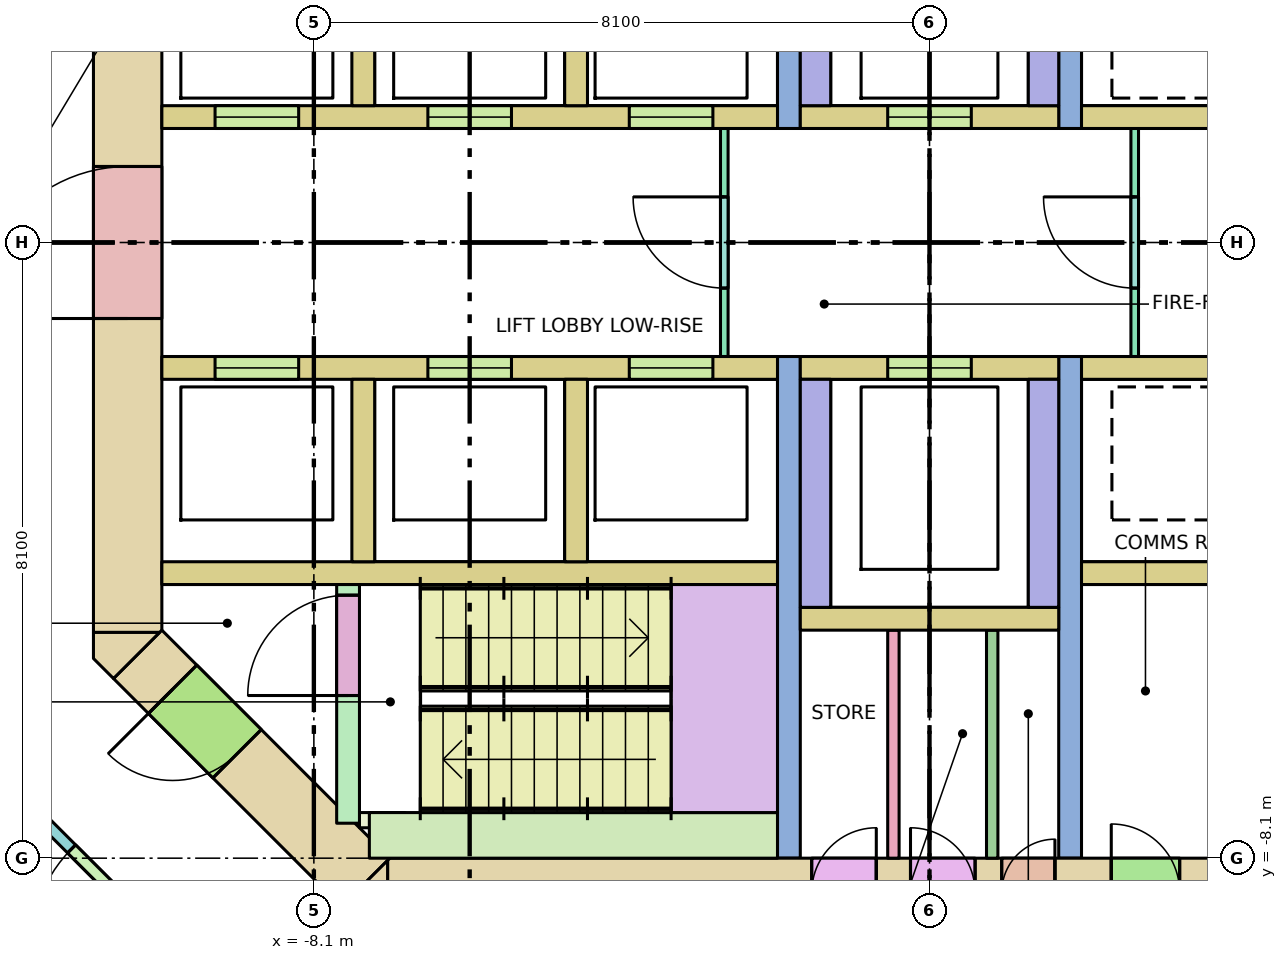
"""IFC4 building model, lengths in metres.
Left out: names, types, materials, properties, quantities, classifications, styles, units other than length and angle.
Written with IfcOpenShell. Run it as: python <this file> out.ifc"""

import sys

from ifc_helpers import new_model, si_unit, direction, frame, frame_2d, origin, place, context, subcontext, project, spatial, polyline, rectangle, outline, extrude, element, fill, save


model = new_model("IFC4")
c1 = context("Model", 3, precision=1e-05, world=origin(), true_north=direction((0.0, 1.0)))
c2 = subcontext(c1, "Body", "Model", "MODEL_VIEW")
j1 = project(units=[si_unit("LENGTHUNIT", "METRE"), si_unit("PLANEANGLEUNIT", "RADIAN")], contexts=[c1])
p1 = place(None, origin())
s1 = spatial("IfcSite", under=j1, at=p1, CompositionType="ELEMENT")
p2 = place(p1, origin())
s2 = spatial("IfcBuilding", under=s1, at=p2, CompositionType="ELEMENT")
p3 = place(p2, frame((0.0, 0.0, 51.0)))
s3 = spatial("IfcBuildingStorey", under=s2, at=p3, CompositionType="ELEMENT", Elevation=51.0)
p4 = place(p3, frame((-7.13, -8.55, -0.28), z_axis=(0.0, 0.0, 1.0), x_axis=(1.0, 0.0, 0.0)))
e1 = element("IfcWall", 1, at=p4, inside=s3, PredefinedType="SHEAR", context=c2, shape_type="SweptSolid", body=[
    extrude(rectangle(XDim=14.26, YDim=0.9, at=frame_2d((7.13, 0.0))), origin(), (0.0, 0.0, 1.0), 4.0),
])
p5 = place(p4, frame((8.08, 0.0, 0.28)))
e2 = element("IfcOpeningElement", 2, at=p5, cuts=e1, PredefinedType="OPENING", context=c2, shape_type="SweptSolid", body=[
    extrude(rectangle(XDim=0.7, YDim=2.1, at=frame_2d((0.35, 1.05))), frame((0.0, 0.46, 0.0), z_axis=(0.0, -1.0, 0.0), x_axis=(1.0, 0.0, 0.0)), (0.0, 0.0, 1.0), 0.92),
])
p6 = place(p4, frame((5.58, 0.0, 0.28)))
e3 = element("IfcOpeningElement", 3, at=p6, cuts=e1, PredefinedType="OPENING", context=c2, shape_type="SweptSolid", body=[
    extrude(rectangle(XDim=0.85, YDim=2.1, at=frame_2d((0.425, 1.05))), frame((0.0, 0.46, 0.0), z_axis=(0.0, -1.0, 0.0), x_axis=(1.0, 0.0, 0.0)), (0.0, 0.0, 1.0), 0.92),
])
p7 = place(p4, frame((6.88, 0.0, 0.28)))
e4 = element("IfcOpeningElement", 4, at=p7, cuts=e1, PredefinedType="OPENING", context=c2, shape_type="SweptSolid", body=[
    extrude(rectangle(XDim=0.85, YDim=2.1, at=frame_2d((0.425, 1.05))), frame((0.0, 0.46, 0.0), z_axis=(0.0, -1.0, 0.0), x_axis=(1.0, 0.0, 0.0)), (0.0, 0.0, 1.0), 0.92),
])
p8 = place(p4, frame((9.521, 0.0, 0.28)))
e5 = element("IfcOpeningElement", 5, at=p8, cuts=e1, PredefinedType="OPENING", context=c2, shape_type="SweptSolid", body=[
    extrude(rectangle(XDim=0.9, YDim=2.1, at=frame_2d((0.45, 1.05))), frame((0.0, 0.46, 0.0), z_axis=(0.0, -1.0, 0.0), x_axis=(1.0, 0.0, 0.0)), (0.0, 0.0, 1.0), 0.92),
])
p9 = place(p4, frame((11.278, 0.0, 0.28)))
e6 = element("IfcOpeningElement", 6, at=p9, cuts=e1, PredefinedType="OPENING", context=c2, shape_type="SweptSolid", body=[
    extrude(rectangle(XDim=0.9, YDim=2.1, at=frame_2d((0.45, 1.05))), frame((0.0, 0.46, 0.0), z_axis=(0.0, -1.0, 0.0), x_axis=(1.0, 0.0, 0.0)), (0.0, 0.0, 1.0), 0.92),
])
p10 = place(p4, frame((12.84, 0.0, 0.28)))
e7 = element("IfcOpeningElement", 7, at=p10, cuts=e1, PredefinedType="OPENING", context=c2, shape_type="SweptSolid", body=[
    extrude(rectangle(XDim=0.9, YDim=2.1, at=frame_2d((0.45, 1.05))), frame((0.0, 0.46, 0.0), z_axis=(0.0, -1.0, 0.0), x_axis=(1.0, 0.0, 0.0)), (0.0, 0.0, 1.0), 0.92),
])
p11 = place(p3, frame((-10.55, -5.13, -0.28), z_axis=(0.0, 0.0, 1.0), x_axis=(0.0, 1.0, 0.0)))
e8 = element("IfcWall", 8, at=p11, inside=s3, PredefinedType="SHEAR", context=c2, shape_type="SweptSolid", body=[
    extrude(rectangle(XDim=10.26, YDim=0.9, at=frame_2d((5.13, 0.0))), origin(), (0.0, 0.0, 1.0), 4.0),
])
p12 = place(p11, frame((4.13, 0.0, 0.28)))
e9 = element("IfcOpeningElement", 9, at=p12, cuts=e8, PredefinedType="OPENING", context=c2, shape_type="SweptSolid", body=[
    extrude(rectangle(XDim=2.0, YDim=2.1, at=frame_2d((1.0, 1.05))), frame((0.0, 0.46, 0.0), z_axis=(0.0, -1.0, 0.0), x_axis=(1.0, 0.0, 0.0)), (0.0, 0.0, 1.0), 0.92),
])
p13 = place(p3, frame((-7.418, -8.418, -0.28), z_axis=(0.0, 0.0, 1.0), x_axis=(-0.707106781187, 0.707106781187, 0.0)))
e10 = element("IfcWall", 10, at=p13, inside=s3, PredefinedType="SHEAR", context=c2, shape_type="SweptSolid", body=[
    extrude(rectangle(XDim=4.243, YDim=0.9, at=frame_2d((2.121, 0.0))), origin(), (0.0, 0.0, 1.0), 4.0),
])
p14 = place(p13, frame((2.393, 0.0, 0.28)))
e11 = element("IfcOpeningElement", 11, at=p14, cuts=e10, PredefinedType="OPENING", context=c2, shape_type="SweptSolid", body=[
    extrude(rectangle(XDim=1.2, YDim=2.1, at=frame_2d((0.6, 1.05))), frame((0.0, 0.46, 0.0), z_axis=(0.0, -1.0, 0.0), x_axis=(1.0, 0.0, 0.0)), (0.0, 0.0, 1.0), 0.92),
])
p15 = place(p3, frame((0.0, 0.0, -0.28)))
e12 = element("IfcWall", 12, at=p15, inside=s3, PredefinedType="SHEAR", context=c2, shape_type="SweptSolid", body=[
    extrude(outline(polyline([(-7.473, -9.0), (-7.736, -8.736), (-7.13, -8.13), (-7.13, -9.0), (-7.473, -9.0)])), origin(), (0.0, 0.0, 1.0), 4.0),
])
p16 = place(p3, frame((0.0, 0.0, -0.28)))
e13 = element("IfcWall", 13, at=p16, inside=s3, PredefinedType="SHEAR", context=c2, shape_type="SweptSolid", body=[
    extrude(outline(polyline([(-11.0, -5.473), (-11.0, -5.13), (-10.13, -5.13), (-10.736, -5.736), (-11.0, -5.473)])), origin(), (0.0, 0.0, 1.0), 4.0),
])
for number, where, z_axis, x_axis in (
    (14, (-10.1, -4.35, 0.0), (0.0, 0.0, 1.0), (1.0, 0.0, 0.0)),
    (15, (2.0, -4.35, 0.0), (0.0, 0.0, 1.0), (1.0, 0.0, 0.0)),
):
    element("IfcWall", number, at=place(p3, frame(where, z_axis=z_axis, x_axis=x_axis)), inside=s3, PredefinedType="SOLIDWALL", context=c2, shape_type="SweptSolid", body=[
        extrude(rectangle(XDim=8.1, YDim=0.3, at=frame_2d((4.05, 0.0))), origin(), (0.0, 0.0, 1.0), 3.72),
    ])
p17 = place(p3, frame((-10.1, 1.65, 0.0), z_axis=(0.0, 0.0, 1.0), x_axis=(1.0, 0.0, 0.0)))
e16 = element("IfcWall", 16, at=p17, inside=s3, PredefinedType="SOLIDWALL", context=c2, shape_type="SweptSolid", body=[
    extrude(rectangle(XDim=8.1, YDim=0.3, at=frame_2d((4.05, 0.0))), origin(), (0.0, 0.0, 1.0), 3.72),
])
p18 = place(p17, frame((0.7, 0.0, 0.0)))
e17 = element("IfcOpeningElement", 17, at=p18, cuts=e16, PredefinedType="OPENING", context=c2, shape_type="SweptSolid", body=[
    extrude(rectangle(XDim=1.1, YDim=2.1, at=frame_2d((0.55, 1.05))), frame((0.0, 0.16, 0.0), z_axis=(0.0, -1.0, 0.0), x_axis=(1.0, 0.0, 0.0)), (0.0, 0.0, 1.0), 0.32),
])
p19 = place(p17, frame((3.5, 0.0, 0.0)))
e18 = element("IfcOpeningElement", 18, at=p19, cuts=e16, PredefinedType="OPENING", context=c2, shape_type="SweptSolid", body=[
    extrude(rectangle(XDim=1.1, YDim=2.1, at=frame_2d((0.55, 1.05))), frame((0.0, 0.16, 0.0), z_axis=(0.0, -1.0, 0.0), x_axis=(1.0, 0.0, 0.0)), (0.0, 0.0, 1.0), 0.32),
])
p20 = place(p17, frame((6.15, 0.0, 0.0)))
e19 = element("IfcOpeningElement", 19, at=p20, cuts=e16, PredefinedType="OPENING", context=c2, shape_type="SweptSolid", body=[
    extrude(rectangle(XDim=1.1, YDim=2.1, at=frame_2d((0.55, 1.05))), frame((0.0, 0.16, 0.0), z_axis=(0.0, -1.0, 0.0), x_axis=(1.0, 0.0, 0.0)), (0.0, 0.0, 1.0), 0.32),
])
p21 = place(p3, frame((-10.1, -1.65, 0.0), z_axis=(0.0, 0.0, 1.0), x_axis=(1.0, 0.0, 0.0)))
e20 = element("IfcWall", 20, at=p21, inside=s3, PredefinedType="SOLIDWALL", context=c2, shape_type="SweptSolid", body=[
    extrude(rectangle(XDim=8.1, YDim=0.3, at=frame_2d((4.05, 0.0))), origin(), (0.0, 0.0, 1.0), 3.72),
])
p22 = place(p21, frame((0.7, 0.0, 0.0)))
e21 = element("IfcOpeningElement", 21, at=p22, cuts=e20, PredefinedType="OPENING", context=c2, shape_type="SweptSolid", body=[
    extrude(rectangle(XDim=1.1, YDim=2.1, at=frame_2d((0.55, 1.05))), frame((0.0, 0.16, 0.0), z_axis=(0.0, -1.0, 0.0), x_axis=(1.0, 0.0, 0.0)), (0.0, 0.0, 1.0), 0.32),
])
p23 = place(p21, frame((3.5, 0.0, 0.0)))
e22 = element("IfcOpeningElement", 22, at=p23, cuts=e20, PredefinedType="OPENING", context=c2, shape_type="SweptSolid", body=[
    extrude(rectangle(XDim=1.1, YDim=2.1, at=frame_2d((0.55, 1.05))), frame((0.0, 0.16, 0.0), z_axis=(0.0, -1.0, 0.0), x_axis=(1.0, 0.0, 0.0)), (0.0, 0.0, 1.0), 0.32),
])
p24 = place(p21, frame((6.15, 0.0, 0.0)))
e23 = element("IfcOpeningElement", 23, at=p24, cuts=e20, PredefinedType="OPENING", context=c2, shape_type="SweptSolid", body=[
    extrude(rectangle(XDim=1.1, YDim=2.1, at=frame_2d((0.55, 1.05))), frame((0.0, 0.16, 0.0), z_axis=(0.0, -1.0, 0.0), x_axis=(1.0, 0.0, 0.0)), (0.0, 0.0, 1.0), 0.32),
])
for number, where, z_axis, x_axis in (
    (24, (2.0, 1.65, 0.0), (0.0, 0.0, 1.0), (1.0, 0.0, 0.0)),
    (25, (2.0, -1.65, 0.0), (0.0, 0.0, 1.0), (1.0, 0.0, 0.0)),
):
    element("IfcWall", number, at=place(p3, frame(where, z_axis=z_axis, x_axis=x_axis)), inside=s3, PredefinedType="SOLIDWALL", context=c2, shape_type="SweptSolid", body=[
        extrude(rectangle(XDim=8.1, YDim=0.3, at=frame_2d((4.05, 0.0))), origin(), (0.0, 0.0, 1.0), 3.72),
    ])
for number, where, z_axis, x_axis in (
    (26, (-7.45, 1.8, 0.0), (0.0, 0.0, 1.0), (0.0, 1.0, 0.0)),
    (27, (-7.45, -4.2, 0.0), (0.0, 0.0, 1.0), (0.0, 1.0, 0.0)),
    (28, (-4.65, 1.8, 0.0), (0.0, 0.0, 1.0), (0.0, 1.0, 0.0)),
    (29, (-4.65, -4.2, 0.0), (0.0, 0.0, 1.0), (0.0, 1.0, 0.0)),
):
    element("IfcWall", number, at=place(p3, frame(where, z_axis=z_axis, x_axis=x_axis)), inside=s3, PredefinedType="SOLIDWALL", context=c2, shape_type="SweptSolid", body=[
        extrude(rectangle(XDim=2.4, YDim=0.3, at=frame_2d((1.2, 0.0))), origin(), (0.0, 0.0, 1.0), 3.72),
    ])
for number, where, z_axis, x_axis in (
    (30, (-1.85, 1.5, 0.0), (0.0, 0.0, 1.0), (0.0, 1.0, 0.0)),
    (31, (-1.85, -8.1, 0.0), (0.0, 0.0, 1.0), (0.0, 1.0, 0.0)),
    (32, (1.85, 1.5, 0.0), (0.0, 0.0, 1.0), (0.0, 1.0, 0.0)),
    (33, (1.85, -8.1, 0.0), (0.0, 0.0, 1.0), (0.0, 1.0, 0.0)),
):
    element("IfcWall", number, at=place(p3, frame(where, z_axis=z_axis, x_axis=x_axis)), inside=s3, PredefinedType="SHEAR", context=c2, shape_type="SweptSolid", body=[
        extrude(rectangle(XDim=6.6, YDim=0.3, at=frame_2d((3.3, 0.0))), origin(), (0.0, 0.0, 1.0), 3.72),
    ])
p25 = place(p3, frame((-1.7, 1.65, 0.0), z_axis=(0.0, 0.0, 1.0), x_axis=(1.0, 0.0, 0.0)))
e34 = element("IfcWall", 34, at=p25, inside=s3, PredefinedType="SOLIDWALL", context=c2, shape_type="SweptSolid", body=[
    extrude(rectangle(XDim=3.4, YDim=0.3, at=frame_2d((1.7, 0.0))), origin(), (0.0, 0.0, 1.0), 3.72),
])
p26 = place(p25, frame((1.15, 0.0, 0.0)))
e35 = element("IfcOpeningElement", 35, at=p26, cuts=e34, PredefinedType="OPENING", context=c2, shape_type="SweptSolid", body=[
    extrude(rectangle(XDim=1.1, YDim=2.1, at=frame_2d((0.55, 1.05))), frame((0.0, 0.16, 0.0), z_axis=(0.0, -1.0, 0.0), x_axis=(1.0, 0.0, 0.0)), (0.0, 0.0, 1.0), 0.32),
])
p27 = place(p3, frame((-1.7, -1.65, 0.0), z_axis=(0.0, 0.0, 1.0), x_axis=(1.0, 0.0, 0.0)))
e36 = element("IfcWall", 36, at=p27, inside=s3, PredefinedType="SOLIDWALL", context=c2, shape_type="SweptSolid", body=[
    extrude(rectangle(XDim=3.4, YDim=0.3, at=frame_2d((1.7, 0.0))), origin(), (0.0, 0.0, 1.0), 3.72),
])
p28 = place(p27, frame((1.15, 0.0, 0.0)))
e37 = element("IfcOpeningElement", 37, at=p28, cuts=e36, PredefinedType="OPENING", context=c2, shape_type="SweptSolid", body=[
    extrude(rectangle(XDim=1.1, YDim=2.1, at=frame_2d((0.55, 1.05))), frame((0.0, 0.16, 0.0), z_axis=(0.0, -1.0, 0.0), x_axis=(1.0, 0.0, 0.0)), (0.0, 0.0, 1.0), 0.32),
])
for number, where, z_axis, x_axis in (
    (38, (-1.5, 1.8, 0.0), (0.0, 0.0, 1.0), (0.0, 1.0, 0.0)),
    (39, (-1.5, -4.8, 0.0), (0.0, 0.0, 1.0), (0.0, 1.0, 0.0)),
    (40, (1.5, 1.8, 0.0), (0.0, 0.0, 1.0), (0.0, 1.0, 0.0)),
    (41, (1.5, -4.8, 0.0), (0.0, 0.0, 1.0), (0.0, 1.0, 0.0)),
):
    element("IfcWall", number, at=place(p3, frame(where, z_axis=z_axis, x_axis=x_axis)), inside=s3, PredefinedType="SOLIDWALL", context=c2, shape_type="SweptSolid", body=[
        extrude(rectangle(XDim=3.0, YDim=0.4, at=frame_2d((1.5, 0.0))), origin(), (0.0, 0.0, 1.0), 3.72),
    ])
p29 = place(p3, frame((-1.7, -4.95, 0.0), z_axis=(0.0, 0.0, 1.0), x_axis=(1.0, 0.0, 0.0)))
e42 = element("IfcWall", 42, at=p29, inside=s3, PredefinedType="SOLIDWALL", context=c2, shape_type="SweptSolid", body=[
    extrude(rectangle(XDim=3.4, YDim=0.3, at=frame_2d((1.7, 0.0))), origin(), (0.0, 0.0, 1.0), 3.72),
])
p30 = place(p3, frame((-7.65, -7.64, 0.0), z_axis=(0.0, 0.0, 1.0), x_axis=(0.0, 1.0, 0.0)))
e43 = element("IfcWall", 43, at=p30, inside=s3, PredefinedType="SHEAR", context=c2, shape_type="SweptSolid", body=[
    extrude(rectangle(XDim=3.14, YDim=0.3, at=frame_2d((1.57, 0.0))), origin(), (0.0, 0.0, 1.0), 3.72),
])
p31 = place(p30, frame((1.68, 0.0, 0.0)))
e44 = element("IfcOpeningElement", 44, at=p31, cuts=e43, PredefinedType="OPENING", context=c2, shape_type="SweptSolid", body=[
    extrude(rectangle(XDim=1.32, YDim=2.1, at=frame_2d((0.66, 1.05))), frame((0.0, 0.16, 0.0), z_axis=(0.0, -1.0, 0.0), x_axis=(1.0, 0.0, 0.0)), (0.0, 0.0, 1.0), 0.32),
])
p32 = place(p3, frame((-7.5, -7.6, 0.0), z_axis=(0.0, 0.0, 1.0), x_axis=(1.0, 0.0, 0.0)))
e45 = element("IfcWall", 45, at=p32, inside=s3, PredefinedType="SHEAR", context=c2, shape_type="SweptSolid", body=[
    extrude(rectangle(XDim=0.6, YDim=0.2, at=frame_2d((0.3, 0.0))), origin(), (0.0, 0.0, 1.0), 3.72),
])
p33 = place(p3, frame((-7.37, -7.8, 0.0), z_axis=(0.0, 0.0, 1.0), x_axis=(1.0, 0.0, 0.0)))
e46 = element("IfcWall", 46, at=p33, inside=s3, PredefinedType="SHEAR", context=c2, shape_type="SweptSolid", body=[
    extrude(rectangle(XDim=5.37, YDim=0.6, at=frame_2d((2.685, 0.0))), origin(), (0.0, 0.0, 1.0), 3.72),
])
p34 = place(p3, frame((-2.7, -1.5, 0.0), z_axis=(0.0, 0.0, 1.0), x_axis=(0.0, 1.0, 0.0)))
e47 = element("IfcWall", 47, at=p34, inside=s3, PredefinedType="PARTITIONING", context=c2, shape_type="SweptSolid", body=[
    extrude(rectangle(XDim=3.0, YDim=0.1, at=frame_2d((1.5, 0.0))), origin(), (0.0, 0.0, 1.0), 3.72),
])
p35 = place(p34, frame((0.9, 0.0, 0.0)))
e48 = element("IfcOpeningElement", 48, at=p35, cuts=e47, PredefinedType="OPENING", context=c2, shape_type="SweptSolid", body=[
    extrude(rectangle(XDim=1.2, YDim=2.1, at=frame_2d((0.6, 1.05))), frame((0.0, 0.06, 0.0), z_axis=(0.0, -1.0, 0.0), x_axis=(1.0, 0.0, 0.0)), (0.0, 0.0, 1.0), 0.12),
])
p36 = place(p3, frame((2.7, -1.5, 0.0), z_axis=(0.0, 0.0, 1.0), x_axis=(0.0, 1.0, 0.0)))
e49 = element("IfcWall", 49, at=p36, inside=s3, PredefinedType="PARTITIONING", context=c2, shape_type="SweptSolid", body=[
    extrude(rectangle(XDim=3.0, YDim=0.1, at=frame_2d((1.5, 0.0))), origin(), (0.0, 0.0, 1.0), 3.72),
])
p37 = place(p36, frame((0.9, 0.0, 0.0)))
e50 = element("IfcOpeningElement", 50, at=p37, cuts=e49, PredefinedType="OPENING", context=c2, shape_type="SweptSolid", body=[
    extrude(rectangle(XDim=1.2, YDim=2.1, at=frame_2d((0.6, 1.05))), frame((0.0, 0.06, 0.0), z_axis=(0.0, -1.0, 0.0), x_axis=(1.0, 0.0, 0.0)), (0.0, 0.0, 1.0), 0.12),
])
for number, where, z_axis, x_axis in (
    (51, (0.825, -8.1, 0.0), (0.0, 0.0, 1.0), (0.0, 1.0, 0.0)),
    (52, (-0.475, -8.1, 0.0), (0.0, 0.0, 1.0), (0.0, 1.0, 0.0)),
):
    element("IfcWall", number, at=place(p3, frame(where, z_axis=z_axis, x_axis=x_axis)), inside=s3, PredefinedType="PARTITIONING", context=c2, shape_type="SweptSolid", body=[
        extrude(rectangle(XDim=3.0, YDim=0.15, at=frame_2d((1.5, 0.0))), origin(), (0.0, 0.0, 1.0), 3.72),
    ])
p38 = place(p3, frame((-8.328, -10.938, 0.0), z_axis=(0.0, 0.0, 1.0), x_axis=(-0.707125355289, 0.707088206597, 0.0)))
e53 = element("IfcWall", 53, at=p38, inside=s3, PredefinedType="PARTITIONING", context=c2, shape_type="SweptSolid", body=[
    extrude(rectangle(XDim=6.572, YDim=0.15, at=frame_2d((3.286, 0.0))), origin(), (0.0, 0.0, 1.0), 2.82),
])
p39 = place(p38, frame((2.386, 0.0, 0.0)))
e54 = element("IfcOpeningElement", 54, at=p39, cuts=e53, PredefinedType="OPENING", context=c2, shape_type="SweptSolid", body=[
    extrude(rectangle(XDim=1.8, YDim=2.1, at=frame_2d((0.9, 1.05))), frame((0.0, 0.085, 0.0), z_axis=(0.0, -1.0, 0.0), x_axis=(1.0, 0.0, 0.0)), (0.0, 0.0, 1.0), 0.17),
])
p40 = place(p18, origin())
e55 = element("IfcDoor", 55, at=p40, inside=s3, OperationType="DOUBLE_DOOR_SLIDING", PredefinedType="DOOR", context=c2, shape_type="SweptSolid", body=[
    extrude(rectangle(XDim=1.1, YDim=2.1, at=frame_2d((0.55, 1.05))), frame((0.0, 0.025, 0.0), z_axis=(0.0, -1.0, 0.0), x_axis=(1.0, 0.0, 0.0)), (0.0, 0.0, 1.0), 0.05),
])
fill(e17, e55)
p41 = place(p19, origin())
e56 = element("IfcDoor", 56, at=p41, inside=s3, OperationType="DOUBLE_DOOR_SLIDING", PredefinedType="DOOR", context=c2, shape_type="SweptSolid", body=[
    extrude(rectangle(XDim=1.1, YDim=2.1, at=frame_2d((0.55, 1.05))), frame((0.0, 0.025, 0.0), z_axis=(0.0, -1.0, 0.0), x_axis=(1.0, 0.0, 0.0)), (0.0, 0.0, 1.0), 0.05),
])
fill(e18, e56)
p42 = place(p20, origin())
e57 = element("IfcDoor", 57, at=p42, inside=s3, OperationType="DOUBLE_DOOR_SLIDING", PredefinedType="DOOR", context=c2, shape_type="SweptSolid", body=[
    extrude(rectangle(XDim=1.1, YDim=2.1, at=frame_2d((0.55, 1.05))), frame((0.0, 0.025, 0.0), z_axis=(0.0, -1.0, 0.0), x_axis=(1.0, 0.0, 0.0)), (0.0, 0.0, 1.0), 0.05),
])
fill(e19, e57)
p43 = place(p22, origin())
e58 = element("IfcDoor", 58, at=p43, inside=s3, OperationType="DOUBLE_DOOR_SLIDING", PredefinedType="DOOR", context=c2, shape_type="SweptSolid", body=[
    extrude(rectangle(XDim=1.1, YDim=2.1, at=frame_2d((0.55, 1.05))), frame((0.0, 0.025, 0.0), z_axis=(0.0, -1.0, 0.0), x_axis=(1.0, 0.0, 0.0)), (0.0, 0.0, 1.0), 0.05),
])
fill(e21, e58)
p44 = place(p23, origin())
e59 = element("IfcDoor", 59, at=p44, inside=s3, OperationType="DOUBLE_DOOR_SLIDING", PredefinedType="DOOR", context=c2, shape_type="SweptSolid", body=[
    extrude(rectangle(XDim=1.1, YDim=2.1, at=frame_2d((0.55, 1.05))), frame((0.0, 0.025, 0.0), z_axis=(0.0, -1.0, 0.0), x_axis=(1.0, 0.0, 0.0)), (0.0, 0.0, 1.0), 0.05),
])
fill(e22, e59)
p45 = place(p24, origin())
e60 = element("IfcDoor", 60, at=p45, inside=s3, OperationType="DOUBLE_DOOR_SLIDING", PredefinedType="DOOR", context=c2, shape_type="SweptSolid", body=[
    extrude(rectangle(XDim=1.1, YDim=2.1, at=frame_2d((0.55, 1.05))), frame((0.0, 0.025, 0.0), z_axis=(0.0, -1.0, 0.0), x_axis=(1.0, 0.0, 0.0)), (0.0, 0.0, 1.0), 0.05),
])
fill(e23, e60)
p46 = place(p26, origin())
e61 = element("IfcDoor", 61, at=p46, inside=s3, OperationType="DOUBLE_DOOR_SLIDING", PredefinedType="DOOR", context=c2, shape_type="SweptSolid", body=[
    extrude(rectangle(XDim=1.1, YDim=2.1, at=frame_2d((0.55, 1.05))), frame((0.0, 0.025, 0.0), z_axis=(0.0, -1.0, 0.0), x_axis=(1.0, 0.0, 0.0)), (0.0, 0.0, 1.0), 0.05),
])
fill(e35, e61)
p47 = place(p28, origin())
e62 = element("IfcDoor", 62, at=p47, inside=s3, OperationType="DOUBLE_DOOR_SLIDING", PredefinedType="DOOR", context=c2, shape_type="SweptSolid", body=[
    extrude(rectangle(XDim=1.1, YDim=2.1, at=frame_2d((0.55, 1.05))), frame((0.0, 0.025, 0.0), z_axis=(0.0, -1.0, 0.0), x_axis=(1.0, 0.0, 0.0)), (0.0, 0.0, 1.0), 0.05),
])
fill(e37, e62)
p48 = place(p31, origin())
e63 = element("IfcDoor", 63, at=p48, inside=s3, OperationType="DOUBLE_DOOR_SINGLE_SWING", PredefinedType="DOOR", context=c2, shape_type="SweptSolid", body=[
    extrude(rectangle(XDim=1.32, YDim=2.1, at=frame_2d((0.66, 1.05))), frame((0.0, 0.025, 0.0), z_axis=(0.0, -1.0, 0.0), x_axis=(1.0, 0.0, 0.0)), (0.0, 0.0, 1.0), 0.05),
])
fill(e44, e63)
p49 = place(p14, origin())
e64 = element("IfcDoor", 64, at=p49, inside=s3, OperationType="SINGLE_SWING_RIGHT", PredefinedType="DOOR", context=c2, shape_type="SweptSolid", body=[
    extrude(rectangle(XDim=1.2, YDim=2.1, at=frame_2d((0.6, 1.05))), frame((0.0, 0.025, 0.0), z_axis=(0.0, -1.0, 0.0), x_axis=(1.0, 0.0, 0.0)), (0.0, 0.0, 1.0), 0.05),
])
fill(e11, e64)
p50 = place(p12, origin())
e65 = element("IfcDoor", 65, at=p50, inside=s3, OperationType="DOUBLE_DOOR_SINGLE_SWING", PredefinedType="DOOR", context=c2, shape_type="SweptSolid", body=[
    extrude(rectangle(XDim=2.0, YDim=2.1, at=frame_2d((1.0, 1.05))), frame((0.0, 0.025, 0.0), z_axis=(0.0, -1.0, 0.0), x_axis=(1.0, 0.0, 0.0)), (0.0, 0.0, 1.0), 0.05),
])
fill(e9, e65)
p51 = place(p35, origin())
e66 = element("IfcDoor", 66, at=p51, inside=s3, OperationType="SINGLE_SWING_RIGHT", PredefinedType="DOOR", context=c2, shape_type="SweptSolid", body=[
    extrude(rectangle(XDim=1.2, YDim=2.1, at=frame_2d((0.6, 1.05))), frame((0.0, 0.025, 0.0), z_axis=(0.0, -1.0, 0.0), x_axis=(1.0, 0.0, 0.0)), (0.0, 0.0, 1.0), 0.05),
])
fill(e48, e66)
p52 = place(p37, origin())
e67 = element("IfcDoor", 67, at=p52, inside=s3, OperationType="SINGLE_SWING_RIGHT", PredefinedType="DOOR", context=c2, shape_type="SweptSolid", body=[
    extrude(rectangle(XDim=1.2, YDim=2.1, at=frame_2d((0.6, 1.05))), frame((0.0, 0.025, 0.0), z_axis=(0.0, -1.0, 0.0), x_axis=(1.0, 0.0, 0.0)), (0.0, 0.0, 1.0), 0.05),
])
fill(e50, e67)
p53 = place(p39, origin())
e68 = element("IfcDoor", 68, at=p53, inside=s3, OperationType="DOUBLE_DOOR_SINGLE_SWING", PredefinedType="DOOR", context=c2, shape_type="SweptSolid", body=[
    extrude(rectangle(XDim=1.8, YDim=2.1, at=frame_2d((0.9, 1.05))), frame((0.0, 0.025, 0.0), z_axis=(0.0, -1.0, 0.0), x_axis=(1.0, 0.0, 0.0)), (0.0, 0.0, 1.0), 0.05),
])
fill(e54, e68)
save(model, sys.argv[1])
